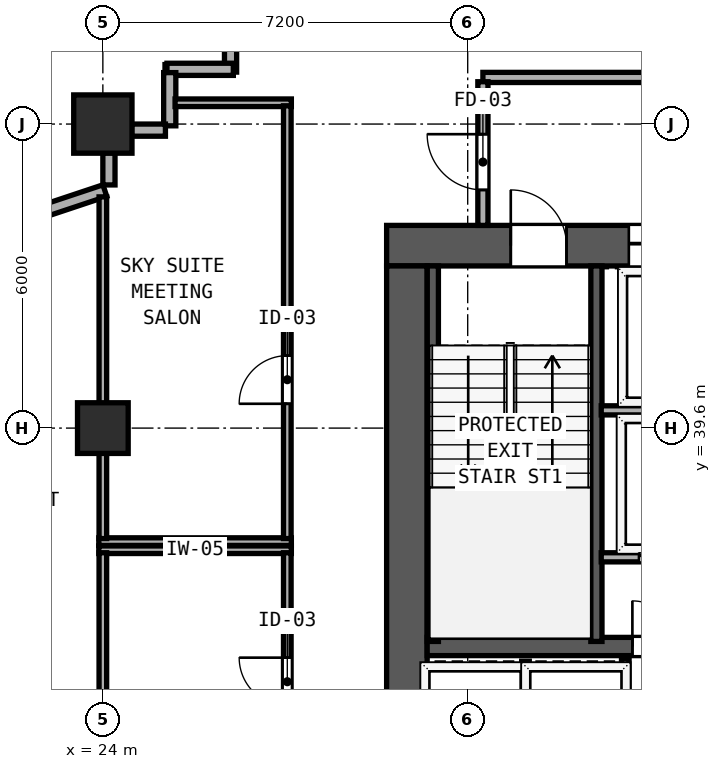
"""IFC4 building model, lengths in metres.
Left out: names, types, materials, properties, quantities, classifications, styles, units other than length and angle.
Written with IfcOpenShell. Run it as: python <this file> out.ifc"""

import sys

from ifc_helpers import new_model, si_unit, direction, frame, frame_2d, origin, origin_2d, place, context, subcontext, project, spatial, rectangle, hollow_rectangle, extrude, element, fill, save


model = new_model("IFC4")
c1 = context("Model", 3, precision=1e-05, world=origin(), true_north=direction((0.0, 1.0)))
c2 = subcontext(c1, "Body", "Model", "MODEL_VIEW")
j1 = project(units=[si_unit("LENGTHUNIT", "METRE"), si_unit("PLANEANGLEUNIT", "RADIAN")], contexts=[c1])
p1 = place(None, origin())
s1 = spatial("IfcSite", under=j1, at=p1, CompositionType="ELEMENT")
p2 = place(p1, origin())
s2 = spatial("IfcBuilding", under=s1, at=p2, CompositionType="ELEMENT")
p3 = place(p2, frame((0.0, 0.0, 85.6)))
s3 = spatial("IfcBuildingStorey", under=s2, at=p3, CompositionType="ELEMENT", Elevation=85.6)
p4 = place(p3, frame((29.6, 43.2, 0.0), z_axis=(0.0, 0.0, 1.0), x_axis=(1.0, 0.0, 0.0)))
e1 = element("IfcWall", 1, at=p4, inside=s3, PredefinedType="SHEAR", context=c2, shape_type="SweptSolid", body=[
    extrude(rectangle(XDim=17.6, YDim=0.8, at=frame_2d((8.8, 0.0))), origin(), (0.0, 0.0, 1.0), 3.54),
])
p5 = place(p4, frame((2.45, 0.0, 0.0)))
e2 = element("IfcOpeningElement", 2, at=p5, cuts=e1, PredefinedType="OPENING", context=c2, shape_type="SweptSolid", body=[
    extrude(rectangle(XDim=1.1, YDim=2.15, at=frame_2d((0.55, 1.075))), frame((0.0, 0.41, 0.0), z_axis=(0.0, -1.0, 0.0), x_axis=(1.0, 0.0, 0.0)), (0.0, 0.0, 1.0), 0.82),
])
p6 = place(p4, frame((7.56, 0.0, 0.0)))
e3 = element("IfcOpeningElement", 3, at=p6, cuts=e1, PredefinedType="OPENING", context=c2, shape_type="SweptSolid", body=[
    extrude(rectangle(XDim=1.1, YDim=2.15, at=frame_2d((0.55, 1.075))), frame((0.0, 0.41, 0.0), z_axis=(0.0, -1.0, 0.0), x_axis=(1.0, 0.0, 0.0)), (0.0, 0.0, 1.0), 0.82),
])
p7 = place(p4, frame((13.65, 0.0, 0.0)))
e4 = element("IfcOpeningElement", 4, at=p7, cuts=e1, PredefinedType="OPENING", context=c2, shape_type="SweptSolid", body=[
    extrude(rectangle(XDim=1.1, YDim=2.15, at=frame_2d((0.55, 1.075))), frame((0.0, 0.41, 0.0), z_axis=(0.0, -1.0, 0.0), x_axis=(1.0, 0.0, 0.0)), (0.0, 0.0, 1.0), 0.82),
])
p8 = place(p4, frame((4.78, 0.0, 0.0)))
e5 = element("IfcOpeningElement", 5, at=p8, cuts=e1, PredefinedType="OPENING", context=c2, shape_type="SweptSolid", body=[
    extrude(rectangle(XDim=1.1, YDim=2.2, at=frame_2d((0.55, 1.1))), frame((0.0, 0.41, 0.0), z_axis=(0.0, -1.0, 0.0), x_axis=(1.0, 0.0, 0.0)), (0.0, 0.0, 1.0), 0.82),
])
p9 = place(p4, frame((11.14, 0.0, 0.0)))
e6 = element("IfcOpeningElement", 6, at=p9, cuts=e1, PredefinedType="OPENING", context=c2, shape_type="SweptSolid", body=[
    extrude(rectangle(XDim=1.1, YDim=2.2, at=frame_2d((0.55, 1.1))), frame((0.0, 0.41, 0.0), z_axis=(0.0, -1.0, 0.0), x_axis=(1.0, 0.0, 0.0)), (0.0, 0.0, 1.0), 0.82),
])
p10 = place(p3, frame((30.0, 32.8, 0.0), z_axis=(0.0, 0.0, 1.0), x_axis=(0.0, 1.0, 0.0)))
e7 = element("IfcWall", 7, at=p10, inside=s3, PredefinedType="SHEAR", context=c2, shape_type="SweptSolid", body=[
    extrude(rectangle(XDim=10.0, YDim=0.8, at=frame_2d((5.0, 0.0))), origin(), (0.0, 0.0, 1.0), 3.54),
])
p11 = place(p3, frame((30.4, 35.29, 0.0), z_axis=(0.0, 0.0, 1.0), x_axis=(1.0, 0.0, 0.0)))
e8 = element("IfcWall", 8, at=p11, inside=s3, PredefinedType="SHEAR", context=c2, shape_type="SweptSolid", body=[
    extrude(rectangle(XDim=16.0, YDim=0.36, at=frame_2d((8.0, 0.0))), origin(), (0.0, 0.0, 1.0), 3.54),
])
p12 = place(p11, frame((4.95, 0.0, 0.0), z_axis=(0.0, 0.0, 1.0), x_axis=(-1.0, 0.0, 0.0)))
e9 = element("IfcOpeningElement", 9, at=p12, cuts=e8, PredefinedType="OPENING", context=c2, shape_type="SweptSolid", body=[
    extrude(rectangle(XDim=0.9, YDim=2.1, at=frame_2d((0.45, 1.05))), frame((0.0, 0.19, 0.0), z_axis=(0.0, -1.0, 0.0), x_axis=(1.0, 0.0, 0.0)), (0.0, 0.0, 1.0), 0.38),
])
p13 = place(p11, frame((12.01, 0.0, 0.0), z_axis=(0.0, 0.0, 1.0), x_axis=(-1.0, 0.0, 0.0)))
e10 = element("IfcOpeningElement", 10, at=p13, cuts=e8, PredefinedType="OPENING", context=c2, shape_type="SweptSolid", body=[
    extrude(rectangle(XDim=0.9, YDim=2.1, at=frame_2d((0.45, 1.05))), frame((0.0, 0.19, 0.0), z_axis=(0.0, -1.0, 0.0), x_axis=(1.0, 0.0, 0.0)), (0.0, 0.0, 1.0), 0.38),
])
for number, where, z_axis, x_axis in (
    (11, (30.512, 35.39, 0.0), (0.0, 0.0, 1.0), (0.0, 1.0, 0.0)),
    (12, (33.74, 35.39, 0.0), (0.0, 0.0, 1.0), (0.0, 1.0, 0.0)),
):
    element("IfcWall", number, at=place(p3, frame(where, z_axis=z_axis, x_axis=x_axis)), inside=s3, PredefinedType="SHEAR", context=c2, shape_type="SweptSolid", body=[
        extrude(rectangle(XDim=7.41, YDim=0.22, at=frame_2d((3.705, 0.0))), origin(), (0.0, 0.0, 1.0), 3.54),
    ])
p14 = place(p3, frame((24.0, 45.6, 0.0), z_axis=(0.0, 0.0, 1.0), x_axis=(1.0, 0.0, 0.0)))
e13 = element("IfcColumn", 13, at=p14, inside=s3, PredefinedType="COLUMN", context=c2, shape_type="SweptSolid", body=[
    extrude(hollow_rectangle(XDim=1.15, YDim=1.15, WallThickness=0.042, at=origin_2d()), origin(), (0.0, 0.0, 1.0), 3.8),
])
p15 = place(p3, frame((24.0, 39.6, 0.0), z_axis=(0.0, 0.0, 1.0), x_axis=(1.0, 0.0, 0.0)))
e14 = element("IfcColumn", 14, at=p15, inside=s3, PredefinedType="COLUMN", context=c2, shape_type="SweptSolid", body=[
    extrude(hollow_rectangle(XDim=1.0, YDim=1.0, WallThickness=0.038, at=origin_2d()), origin(), (0.0, 0.0, 1.0), 3.8),
])
p16 = place(p3, frame((26.52, 47.995, 0.0), z_axis=(0.0, 0.0, 1.0), x_axis=(0.0, -1.0, 0.0)))
e15 = element("IfcWall", 15, at=p16, inside=s3, PredefinedType="SOLIDWALL", context=c2, shape_type="SweptSolid", body=[
    extrude(rectangle(XDim=1.37, YDim=0.24, at=frame_2d((0.685, 0.0))), origin(), (0.0, 0.0, 1.0), 3.54),
])
p17 = place(p3, frame((26.575, 46.68, 0.0), z_axis=(0.0, 0.0, 1.0), x_axis=(-1.0, 0.0, 0.0)))
e16 = element("IfcWall", 16, at=p17, inside=s3, PredefinedType="SOLIDWALL", context=c2, shape_type="SweptSolid", body=[
    extrude(rectangle(XDim=1.31, YDim=0.24, at=frame_2d((0.655, 0.0))), origin(), (0.0, 0.0, 1.0), 3.54),
])
p18 = place(p3, frame((25.32, 46.615, 0.0), z_axis=(0.0, 0.0, 1.0), x_axis=(0.0, -1.0, 0.0)))
e17 = element("IfcWall", 17, at=p18, inside=s3, PredefinedType="SOLIDWALL", context=c2, shape_type="SweptSolid", body=[
    extrude(rectangle(XDim=1.05, YDim=0.24, at=frame_2d((0.525, 0.0))), origin(), (0.0, 0.0, 1.0), 3.54),
])
p19 = place(p3, frame((25.235, 45.48, 0.0), z_axis=(0.0, 0.0, 1.0), x_axis=(-1.0, 0.0, 0.0)))
e18 = element("IfcWall", 18, at=p19, inside=s3, PredefinedType="SOLIDWALL", context=c2, shape_type="SweptSolid", body=[
    extrude(rectangle(XDim=0.668, YDim=0.24, at=frame_2d((0.334, 0.0))), origin(), (0.0, 0.0, 1.0), 3.54),
])
p20 = place(p3, frame((24.12, 45.033, 0.0), z_axis=(0.0, 0.0, 1.0), x_axis=(0.0, -1.0, 0.0)))
e19 = element("IfcWall", 19, at=p20, inside=s3, PredefinedType="SOLIDWALL", context=c2, shape_type="SweptSolid", body=[
    extrude(rectangle(XDim=0.635, YDim=0.24, at=frame_2d((0.317, 0.0))), origin(), (0.0, 0.0, 1.0), 3.037),
])
p21 = place(p3, frame((24.039, 44.287, 0.0), z_axis=(0.0, 0.0, 1.0), x_axis=(-0.948678995954, -0.316240672014, 0.0)))
e20 = element("IfcWall", 20, at=p21, inside=s3, PredefinedType="SOLIDWALL", context=c2, shape_type="SweptSolid", body=[
    extrude(rectangle(XDim=5.675, YDim=0.24, at=frame_2d((2.837, 0.0))), origin(), (0.0, 0.0, 1.0), 3.037),
])
p22 = place(p21, frame((1.6, 0.0, 0.85)))
e21 = element("IfcOpeningElement", 21, at=p22, cuts=e20, PredefinedType="OPENING", context=c2, shape_type="SweptSolid", body=[
    extrude(rectangle(XDim=1.2, YDim=1.85, at=frame_2d((0.6, 0.925))), frame((0.0, 0.13, 0.0), z_axis=(0.0, -1.0, 0.0), x_axis=(1.0, 0.0, 0.0)), (0.0, 0.0, 1.0), 0.26),
])
p23 = place(p21, frame((4.206, 0.0, 0.85)))
e22 = element("IfcOpeningElement", 22, at=p23, cuts=e20, PredefinedType="OPENING", context=c2, shape_type="SweptSolid", body=[
    extrude(rectangle(XDim=1.1, YDim=1.75, at=frame_2d((0.55, 0.875))), frame((0.0, 0.13, 0.0), z_axis=(0.0, -1.0, 0.0), x_axis=(1.0, 0.0, 0.0)), (0.0, 0.0, 1.0), 0.26),
])
p24 = place(p3, frame((31.5, 46.52, 0.0), z_axis=(0.0, 0.0, 1.0), x_axis=(1.0, 0.0, 0.0)))
e23 = element("IfcWall", 23, at=p24, inside=s3, PredefinedType="SOLIDWALL", context=c2, shape_type="SweptSolid", body=[
    extrude(rectangle(XDim=13.8, YDim=0.2, at=frame_2d((6.9, 0.0))), origin(), (0.0, 0.0, 1.0), 3.54),
])
p25 = place(p3, frame((31.5, 43.6, 0.0), z_axis=(0.0, 0.0, 1.0), x_axis=(0.0, 1.0, 0.0)))
e24 = element("IfcWall", 24, at=p25, inside=s3, PredefinedType="SOLIDWALL", context=c2, shape_type="SweptSolid", body=[
    extrude(rectangle(XDim=2.835, YDim=0.2, at=frame_2d((1.417, 0.0))), origin(), (0.0, 0.0, 1.0), 3.54),
])
p26 = place(p25, frame((1.8, 0.0, 0.0), z_axis=(0.0, 0.0, 1.0), x_axis=(-1.0, 0.0, 0.0)))
e25 = element("IfcOpeningElement", 25, at=p26, cuts=e24, PredefinedType="OPENING", context=c2, shape_type="SweptSolid", body=[
    extrude(rectangle(XDim=1.1, YDim=2.15, at=frame_2d((0.55, 1.075))), frame((0.0, 0.11, 0.0), z_axis=(0.0, -1.0, 0.0), x_axis=(1.0, 0.0, 0.0)), (0.0, 0.0, 1.0), 0.22),
])
p27 = place(p3, frame((33.835, 39.95, 0.0), z_axis=(0.0, 0.0, 1.0), x_axis=(1.0, 0.0, 0.0)))
e26 = element("IfcWall", 26, at=p27, inside=s3, PredefinedType="SOLIDWALL", context=c2, shape_type="SweptSolid", body=[
    extrude(rectangle(XDim=2.77, YDim=0.18, at=frame_2d((1.385, 0.0))), origin(), (0.0, 0.0, 1.0), 3.54),
])
p28 = place(p3, frame((33.835, 37.05, 0.0), z_axis=(0.0, 0.0, 1.0), x_axis=(1.0, 0.0, 0.0)))
e27 = element("IfcWall", 27, at=p28, inside=s3, PredefinedType="SOLIDWALL", context=c2, shape_type="SweptSolid", body=[
    extrude(rectangle(XDim=2.77, YDim=0.18, at=frame_2d((1.385, 0.0))), origin(), (0.0, 0.0, 1.0), 3.54),
])
p29 = place(p28, frame((1.945, 0.0, 0.0), z_axis=(0.0, 0.0, 1.0), x_axis=(-1.0, 0.0, 0.0)))
e28 = element("IfcOpeningElement", 28, at=p29, cuts=e27, PredefinedType="OPENING", context=c2, shape_type="SweptSolid", body=[
    extrude(rectangle(XDim=1.2, YDim=2.2, at=frame_2d((0.6, 1.1))), frame((0.0, 0.1, 0.0), z_axis=(0.0, -1.0, 0.0), x_axis=(1.0, 0.0, 0.0)), (0.0, 0.0, 1.0), 0.2),
])
p30 = place(p3, frame((34.31, 32.88, 0.0), z_axis=(0.0, 0.0, 1.0), x_axis=(0.0, 1.0, 0.0)))
e29 = element("IfcWall", 29, at=p30, inside=s3, PredefinedType="SOLIDWALL", context=c2, shape_type="SweptSolid", body=[
    extrude(rectangle(XDim=2.17, YDim=0.15, at=frame_2d((1.085, 0.0))), origin(), (0.0, 0.0, 1.0), 3.54),
])
p31 = place(p3, frame((32.34, 32.95, 0.0), z_axis=(0.0, 0.0, 1.0), x_axis=(0.0, 1.0, 0.0)))
e30 = element("IfcWall", 30, at=p31, inside=s3, PredefinedType="SOLIDWALL", context=c2, shape_type="SweptSolid", body=[
    extrude(rectangle(XDim=2.05, YDim=0.15, at=frame_2d((1.025, 0.0))), origin(), (0.0, 0.0, 1.0), 3.54),
])
p32 = place(p3, frame((23.92, 37.2, 0.0), z_axis=(0.0, 0.0, 1.0), x_axis=(1.0, 0.0, 0.0)))
e31 = element("IfcWall", 31, at=p32, inside=s3, PredefinedType="PARTITIONING", context=c2, shape_type="SweptSolid", body=[
    extrude(rectangle(XDim=3.8, YDim=0.15, at=frame_2d((1.9, 0.0))), origin(), (0.0, 0.0, 1.0), 3.54),
])
p33 = place(p3, frame((24.0, 33.06, 0.0), z_axis=(0.0, 0.0, 1.0), x_axis=(0.0, 1.0, 0.0)))
e32 = element("IfcWall", 32, at=p33, inside=s3, PredefinedType="PARTITIONING", context=c2, shape_type="SweptSolid", body=[
    extrude(rectangle(XDim=4.08, YDim=0.15, at=frame_2d((2.04, 0.0))), origin(), (0.0, 0.0, 1.0), 3.037),
])
p34 = place(p3, frame((27.64, 33.06, 0.0), z_axis=(0.0, 0.0, 1.0), x_axis=(0.0, 1.0, 0.0)))
e33 = element("IfcWall", 33, at=p34, inside=s3, PredefinedType="PARTITIONING", context=c2, shape_type="SweptSolid", body=[
    extrude(rectangle(XDim=4.08, YDim=0.15, at=frame_2d((2.04, 0.0))), origin(), (0.0, 0.0, 1.0), 3.54),
])
p35 = place(p34, frame((2.01, 0.0, 0.0), z_axis=(0.0, 0.0, 1.0), x_axis=(-1.0, 0.0, 0.0)))
e34 = element("IfcOpeningElement", 34, at=p35, cuts=e33, PredefinedType="OPENING", context=c2, shape_type="SweptSolid", body=[
    extrude(rectangle(XDim=0.95, YDim=2.12, at=frame_2d((0.475, 1.06))), frame((0.0, 0.085, 0.0), z_axis=(0.0, -1.0, 0.0), x_axis=(1.0, 0.0, 0.0)), (0.0, 0.0, 1.0), 0.17),
])
p36 = place(p3, frame((25.425, 46.02, 0.0), z_axis=(0.0, 0.0, 1.0), x_axis=(1.0, 0.0, 0.0)))
e35 = element("IfcWall", 35, at=p36, inside=s3, PredefinedType="PARTITIONING", context=c2, shape_type="SweptSolid", body=[
    extrude(rectangle(XDim=2.295, YDim=0.15, at=frame_2d((1.147, 0.0))), origin(), (0.0, 0.0, 1.0), 3.54),
])
p37 = place(p3, frame((23.92, 37.36, 0.0), z_axis=(0.0, 0.0, 1.0), x_axis=(1.0, 0.0, 0.0)))
e36 = element("IfcWall", 36, at=p37, inside=s3, PredefinedType="PARTITIONING", context=c2, shape_type="SweptSolid", body=[
    extrude(rectangle(XDim=3.8, YDim=0.15, at=frame_2d((1.9, 0.0))), origin(), (0.0, 0.0, 1.0), 3.54),
])
p38 = place(p3, frame((24.0, 37.42, 0.0), z_axis=(0.0, 0.0, 1.0), x_axis=(0.0, 1.0, 0.0)))
e37 = element("IfcWall", 37, at=p38, inside=s3, PredefinedType="PARTITIONING", context=c2, shape_type="SweptSolid", body=[
    extrude(rectangle(XDim=6.743, YDim=0.15, at=frame_2d((3.372, 0.0))), origin(), (0.0, 0.0, 1.0), 3.037),
])
p39 = place(p3, frame((27.64, 37.42, 0.0), z_axis=(0.0, 0.0, 1.0), x_axis=(0.0, 1.0, 0.0)))
e38 = element("IfcWall", 38, at=p39, inside=s3, PredefinedType="PARTITIONING", context=c2, shape_type="SweptSolid", body=[
    extrude(rectangle(XDim=8.54, YDim=0.15, at=frame_2d((4.27, 0.0))), origin(), (0.0, 0.0, 1.0), 3.54),
])
p40 = place(p39, frame((3.61, 0.0, 0.0), z_axis=(0.0, 0.0, 1.0), x_axis=(-1.0, 0.0, 0.0)))
e39 = element("IfcOpeningElement", 39, at=p40, cuts=e38, PredefinedType="OPENING", context=c2, shape_type="SweptSolid", body=[
    extrude(rectangle(XDim=0.95, YDim=2.12, at=frame_2d((0.475, 1.06))), frame((0.0, 0.085, 0.0), z_axis=(0.0, -1.0, 0.0), x_axis=(1.0, 0.0, 0.0)), (0.0, 0.0, 1.0), 0.17),
])
p41 = place(p5, origin())
e40 = element("IfcDoor", 40, at=p41, inside=s3, OperationType="SINGLE_SWING_LEFT", PredefinedType="DOOR", context=c2, shape_type="SweptSolid", body=[
    extrude(rectangle(XDim=1.1, YDim=2.15, at=frame_2d((0.55, 1.075))), frame((0.0, 0.185, 0.0), z_axis=(0.0, -1.0, 0.0), x_axis=(1.0, 0.0, 0.0)), (0.0, 0.0, 1.0), 0.05),
])
fill(e2, e40)
p42 = place(p26, origin())
e41 = element("IfcDoor", 41, at=p42, inside=s3, OperationType="SINGLE_SWING_LEFT", PredefinedType="DOOR", context=c2, shape_type="SweptSolid", body=[
    extrude(rectangle(XDim=1.1, YDim=2.15, at=frame_2d((0.55, 1.075))), frame((0.0, 0.025, 0.0), z_axis=(0.0, -1.0, 0.0), x_axis=(1.0, 0.0, 0.0)), (0.0, 0.0, 1.0), 0.05),
])
fill(e25, e41)
p43 = place(p8, origin())
e42 = element("IfcDoor", 42, at=p43, inside=s3, OperationType="SLIDING_TO_LEFT", PredefinedType="DOOR", context=c2, shape_type="SweptSolid", body=[
    extrude(rectangle(XDim=1.1, YDim=2.2, at=frame_2d((0.55, 1.1))), frame((0.0, 0.185, 0.0), z_axis=(0.0, -1.0, 0.0), x_axis=(1.0, 0.0, 0.0)), (0.0, 0.0, 1.0), 0.05),
])
fill(e5, e42)
p44 = place(p29, origin())
e43 = element("IfcDoor", 43, at=p44, inside=s3, OperationType="SLIDING_TO_RIGHT", PredefinedType="DOOR", context=c2, shape_type="SweptSolid", body=[
    extrude(rectangle(XDim=1.2, YDim=2.2, at=frame_2d((0.6, 1.1))), frame((0.0, 0.025, 0.0), z_axis=(0.0, -1.0, 0.0), x_axis=(1.0, 0.0, 0.0)), (0.0, 0.0, 1.0), 0.05),
])
fill(e28, e43)
p45 = place(p12, origin())
e44 = element("IfcDoor", 44, at=p45, inside=s3, OperationType="SINGLE_SWING_RIGHT", PredefinedType="DOOR", context=c2, shape_type="SweptSolid", body=[
    extrude(rectangle(XDim=0.9, YDim=2.1, at=frame_2d((0.45, 1.05))), frame((0.0, 0.025, 0.0), z_axis=(0.0, -1.0, 0.0), x_axis=(1.0, 0.0, 0.0)), (0.0, 0.0, 1.0), 0.05),
])
fill(e9, e44)
p46 = place(p35, origin())
e45 = element("IfcDoor", 45, at=p46, inside=s3, OperationType="SINGLE_SWING_LEFT", PredefinedType="DOOR", context=c2, shape_type="SweptSolid", body=[
    extrude(rectangle(XDim=0.95, YDim=2.12, at=frame_2d((0.475, 1.06))), frame((0.0, 0.025, 0.0), z_axis=(0.0, -1.0, 0.0), x_axis=(1.0, 0.0, 0.0)), (0.0, 0.0, 1.0), 0.05),
])
fill(e34, e45)
p47 = place(p40, origin())
e46 = element("IfcDoor", 46, at=p47, inside=s3, OperationType="SINGLE_SWING_RIGHT", PredefinedType="DOOR", context=c2, shape_type="SweptSolid", body=[
    extrude(rectangle(XDim=0.95, YDim=2.12, at=frame_2d((0.475, 1.06))), frame((0.0, 0.025, 0.0), z_axis=(0.0, -1.0, 0.0), x_axis=(1.0, 0.0, 0.0)), (0.0, 0.0, 1.0), 0.05),
])
fill(e39, e46)
save(model, sys.argv[1])
